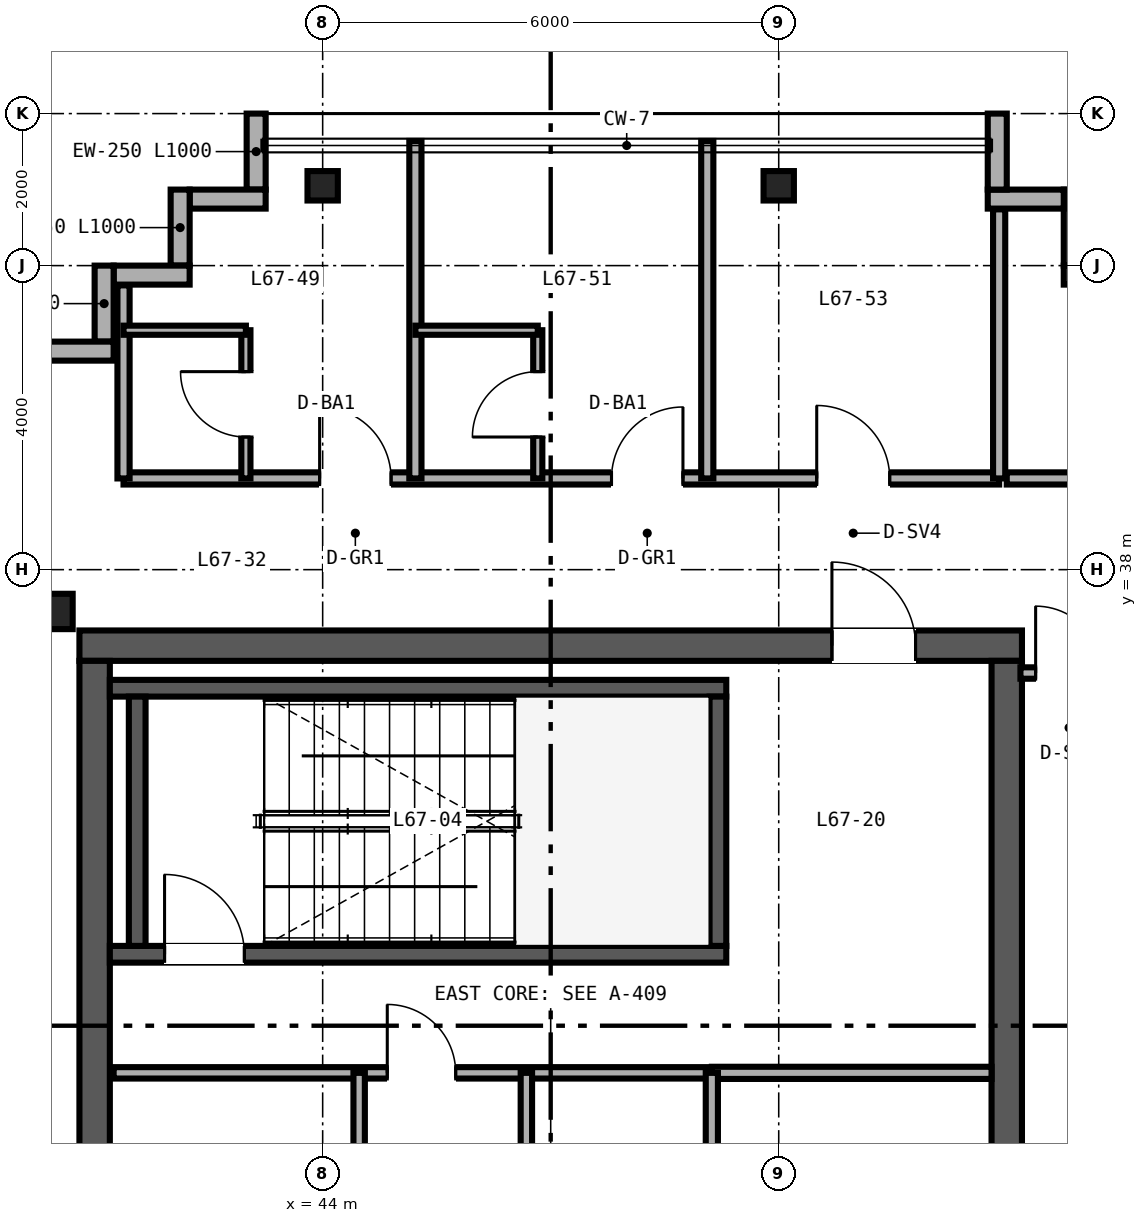
"""IFC4 building model, lengths in metres.
Left out: names, types, materials, properties, quantities, classifications, styles, units other than length and angle.
Written with IfcOpenShell. Run it as: python <this file> out.ifc"""

import sys

from ifc_helpers import new_model, si_unit, direction, frame, frame_2d, origin, origin_2d, place, context, subcontext, project, spatial, rectangle, i_section, extrude, source, transform, mapped, element, fill, save


model = new_model("IFC4")
c1 = context("Model", 3, precision=1e-05, world=origin(), true_north=direction((0.0, 1.0)))
c2 = subcontext(c1, "Body", "Model", "MODEL_VIEW")
j1 = project(units=[si_unit("LENGTHUNIT", "METRE"), si_unit("PLANEANGLEUNIT", "RADIAN")], contexts=[c1])
p1 = place(None, origin())
s1 = spatial("IfcSite", under=j1, at=p1, CompositionType="ELEMENT")
p2 = place(p1, origin())
s2 = spatial("IfcBuilding", under=s1, at=p2, CompositionType="ELEMENT")
p3 = place(p2, frame((0.0, 0.0, 265.2)))
s3 = spatial("IfcBuildingStorey", under=s2, at=p3, CompositionType="ELEMENT", Elevation=265.2)
p4 = place(p3, frame((40.8, 37.0, 0.0), z_axis=(0.0, 0.0, 1.0), x_axis=(1.0, 0.0, 0.0)))
e1 = element("IfcWall", 1, at=p4, inside=s3, PredefinedType="SHEAR", context=c2, shape_type="SweptSolid", body=[
    extrude(rectangle(XDim=12.4, YDim=0.4, at=frame_2d((6.2, 0.0))), origin(), (0.0, 0.0, 1.0), 3.38),
])
p5 = place(p4, frame((9.9, 0.0, 0.0)))
e2 = element("IfcOpeningElement", 2, at=p5, cuts=e1, PredefinedType="OPENING", context=c2, shape_type="SweptSolid", body=[
    extrude(rectangle(XDim=1.1, YDim=2.15, at=frame_2d((0.55, 1.075))), frame((0.0, 0.21, 0.0), z_axis=(0.0, -1.0, 0.0), x_axis=(1.0, 0.0, 0.0)), (0.0, 0.0, 1.0), 0.42),
])
for number, where, z_axis, x_axis in (
    (3, (41.0, 15.2, 0.0), (0.0, 0.0, 1.0), (0.0, 1.0, 0.0)),
    (4, (53.0, 15.2, 0.0), (0.0, 0.0, 1.0), (0.0, 1.0, 0.0)),
):
    element("IfcWall", number, at=place(p3, frame(where, z_axis=z_axis, x_axis=x_axis)), inside=s3, PredefinedType="SHEAR", context=c2, shape_type="SweptSolid", body=[
        extrude(rectangle(XDim=21.6, YDim=0.4, at=frame_2d((10.8, 0.0))), origin(), (0.0, 0.0, 1.0), 3.38),
    ])
p6 = place(p3, frame((41.2, 32.94, 0.0), z_axis=(0.0, 0.0, 1.0), x_axis=(1.0, 0.0, 0.0)))
e5 = element("IfcWall", 5, at=p6, inside=s3, PredefinedType="SHEAR", context=c2, shape_type="SweptSolid", body=[
    extrude(rectangle(XDim=8.11, YDim=0.22, at=frame_2d((4.055, 0.0))), origin(), (0.0, 0.0, 1.0), 3.4),
])
p7 = place(p6, frame((0.72, 0.0, 0.0)))
e6 = element("IfcOpeningElement", 6, at=p7, cuts=e5, PredefinedType="OPENING", context=c2, shape_type="SweptSolid", body=[
    extrude(rectangle(XDim=1.05, YDim=2.15, at=frame_2d((0.525, 1.075))), frame((0.0, 0.12, 0.0), z_axis=(0.0, -1.0, 0.0), x_axis=(1.0, 0.0, 0.0)), (0.0, 0.0, 1.0), 0.24),
])
p8 = place(p3, frame((41.2, 36.44, 0.0), z_axis=(0.0, 0.0, 1.0), x_axis=(1.0, 0.0, 0.0)))
e7 = element("IfcWall", 7, at=p8, inside=s3, PredefinedType="SHEAR", context=c2, shape_type="SweptSolid", body=[
    extrude(rectangle(XDim=8.11, YDim=0.22, at=frame_2d((4.055, 0.0))), origin(), (0.0, 0.0, 1.0), 3.4),
])
for number, where, z_axis, x_axis in (
    (8, (41.56, 33.05, 0.0), (0.0, 0.0, 1.0), (0.0, 1.0, 0.0)),
    (9, (49.2, 33.05, 0.0), (0.0, 0.0, 1.0), (0.0, 1.0, 0.0)),
):
    element("IfcWall", number, at=place(p3, frame(where, z_axis=z_axis, x_axis=x_axis)), inside=s3, PredefinedType="SHEAR", context=c2, shape_type="SweptSolid", body=[
        extrude(rectangle(XDim=3.28, YDim=0.22, at=frame_2d((1.64, 0.0))), origin(), (0.0, 0.0, 1.0), 3.4),
    ])
m1 = source(origin(), c2, "Body", "SweptSolid", [
    extrude(i_section(OverallWidth=0.422, OverallDepth=0.465, WebThickness=0.045, FlangeThickness=0.073, FilletRadius=0.025, at=origin_2d()), origin(), (0.0, 0.0, 1.0), 3.38),
])
p9 = place(p3, frame((40.5, 37.45, 0.0), z_axis=(0.0, 0.0, 1.0), x_axis=(1.0, 0.0, 0.0)))
e10 = element("IfcColumn", 10, at=p9, inside=s3, PredefinedType="COLUMN", context=c2, shape_type="MappedRepresentation", body=[
    mapped(m1, transform((0.0, 0.0, 0.0), scale=1.0)),
])
m2 = source(origin(), c2, "Body", "SweptSolid", [
    extrude(i_section(OverallWidth=0.399, OverallDepth=0.387, WebThickness=0.021, FlangeThickness=0.033, FilletRadius=0.025, at=origin_2d()), origin(), (0.0, 0.0, 1.0), 3.38),
])
for number, where, z_axis, x_axis in (
    (11, (44.0, 43.05, 0.0), (0.0, 0.0, 1.0), (1.0, 0.0, 0.0)),
    (12, (50.0, 43.05, 0.0), (0.0, 0.0, 1.0), (1.0, 0.0, 0.0)),
):
    element("IfcColumn", number, at=place(p3, frame(where, z_axis=z_axis, x_axis=x_axis)), inside=s3, PredefinedType="COLUMN", context=c2, shape_type="MappedRepresentation", body=[
        mapped(m2, transform((0.0, 0.0, 0.0), scale=1.0)),
    ])
for number, where, z_axis, x_axis in (
    (13, (54.75, 41.875, 0.0), (0.0, 0.0, 1.0), (-1.0, 0.0, 0.0)),
    (14, (53.875, 42.0, 0.0), (0.0, 0.0, 1.0), (0.0, 1.0, 0.0)),
    (15, (53.75, 42.875, 0.0), (0.0, 0.0, 1.0), (-1.0, 0.0, 0.0)),
    (16, (52.875, 43.0, 0.0), (0.0, 0.0, 1.0), (0.0, 1.0, 0.0)),
    (17, (43.125, 44.0, 0.0), (0.0, 0.0, 1.0), (0.0, -1.0, 0.0)),
    (18, (43.25, 42.875, 0.0), (0.0, 0.0, 1.0), (-1.0, 0.0, 0.0)),
    (19, (42.125, 43.0, 0.0), (0.0, 0.0, 1.0), (0.0, -1.0, 0.0)),
    (20, (42.25, 41.875, 0.0), (0.0, 0.0, 1.0), (-1.0, 0.0, 0.0)),
    (21, (41.125, 42.0, 0.0), (0.0, 0.0, 1.0), (0.0, -1.0, 0.0)),
):
    element("IfcWall", number, at=place(p3, frame(where, z_axis=z_axis, x_axis=x_axis)), inside=s3, PredefinedType="SOLIDWALL", context=c2, shape_type="SweptSolid", body=[
        extrude(rectangle(XDim=1.0, YDim=0.25, at=frame_2d((0.5, 0.0))), origin(), (0.0, 0.0, 1.0), 3.38),
    ])
p10 = place(p3, frame((41.25, 40.875, 0.0), z_axis=(0.0, 0.0, 1.0), x_axis=(-1.0, 0.0, 0.0)))
e22 = element("IfcWall", 22, at=p10, inside=s3, PredefinedType="SOLIDWALL", context=c2, shape_type="SweptSolid", body=[
    extrude(rectangle(XDim=1.25, YDim=0.25, at=frame_2d((0.625, 0.0))), origin(), (0.0, 0.0, 1.0), 3.38),
])
p11 = place(p3, frame((41.25, 31.38, 0.0), z_axis=(0.0, 0.0, 1.0), x_axis=(1.0, 0.0, 0.0)))
e23 = element("IfcWall", 23, at=p11, inside=s3, PredefinedType="PARTITIONING", context=c2, shape_type="SweptSolid", body=[
    extrude(rectangle(XDim=7.87, YDim=0.15, at=frame_2d((3.935, 0.0))), origin(), (0.0, 0.0, 1.0), 2.48),
])
p12 = place(p11, frame((3.6, 0.0, 0.0)))
e24 = element("IfcOpeningElement", 24, at=p12, cuts=e23, PredefinedType="OPENING", context=c2, shape_type="SweptSolid", body=[
    extrude(rectangle(XDim=0.9, YDim=2.15, at=frame_2d((0.45, 1.075))), frame((0.0, 0.085, 0.0), z_axis=(0.0, -1.0, 0.0), x_axis=(1.0, 0.0, 0.0)), (0.0, 0.0, 1.0), 0.17),
])
p13 = place(p3, frame((46.68, 15.25, 0.0), z_axis=(0.0, 0.0, 1.0), x_axis=(0.0, 1.0, 0.0)))
e25 = element("IfcWall", 25, at=p13, inside=s3, PredefinedType="PARTITIONING", context=c2, shape_type="SweptSolid", body=[
    extrude(rectangle(XDim=16.13, YDim=0.15, at=frame_2d((8.065, 0.0))), origin(), (0.0, 0.0, 1.0), 2.453),
])
p14 = place(p13, frame((3.2, 0.0, 0.0)))
e26 = element("IfcOpeningElement", 26, at=p14, cuts=e25, PredefinedType="OPENING", context=c2, shape_type="SweptSolid", body=[
    extrude(rectangle(XDim=0.88, YDim=2.15, at=frame_2d((0.44, 1.075))), frame((0.0, 0.085, 0.0), z_axis=(0.0, -1.0, 0.0), x_axis=(1.0, 0.0, 0.0)), (0.0, 0.0, 1.0), 0.17),
])
p15 = place(p13, frame((11.2, 0.0, 0.0)))
e27 = element("IfcOpeningElement", 27, at=p15, cuts=e25, PredefinedType="OPENING", context=c2, shape_type="SweptSolid", body=[
    extrude(rectangle(XDim=0.88, YDim=2.15, at=frame_2d((0.44, 1.075))), frame((0.0, 0.085, 0.0), z_axis=(0.0, -1.0, 0.0), x_axis=(1.0, 0.0, 0.0)), (0.0, 0.0, 1.0), 0.17),
])
p16 = place(p3, frame((49.12, 31.38, 0.0), z_axis=(0.0, 0.0, 1.0), x_axis=(1.0, 0.0, 0.0)))
e28 = element("IfcWall", 28, at=p16, inside=s3, PredefinedType="PARTITIONING", context=c2, shape_type="SweptSolid", body=[
    extrude(rectangle(XDim=3.68, YDim=0.16, at=frame_2d((1.84, 0.0))), origin(), (0.0, 0.0, 1.0), 2.48),
])
p17 = place(p3, frame((49.12, 15.25, 0.0), z_axis=(0.0, 0.0, 1.0), x_axis=(0.0, 1.0, 0.0)))
e29 = element("IfcWall", 29, at=p17, inside=s3, PredefinedType="PARTITIONING", context=c2, shape_type="SweptSolid", body=[
    extrude(rectangle(XDim=16.13, YDim=0.16, at=frame_2d((8.065, 0.0))), origin(), (0.0, 0.0, 1.0), 2.453),
])
p18 = place(p17, frame((2.2, 0.0, 0.0)))
e30 = element("IfcOpeningElement", 30, at=p18, cuts=e29, PredefinedType="OPENING", context=c2, shape_type="SweptSolid", body=[
    extrude(rectangle(XDim=0.9, YDim=2.15, at=frame_2d((0.45, 1.075))), frame((0.0, 0.09, 0.0), z_axis=(0.0, -1.0, 0.0), x_axis=(1.0, 0.0, 0.0)), (0.0, 0.0, 1.0), 0.18),
])
p19 = place(p17, frame((8.2, 0.0, 0.0)))
e31 = element("IfcOpeningElement", 31, at=p19, cuts=e29, PredefinedType="OPENING", context=c2, shape_type="SweptSolid", body=[
    extrude(rectangle(XDim=0.9, YDim=2.15, at=frame_2d((0.45, 1.075))), frame((0.0, 0.09, 0.0), z_axis=(0.0, -1.0, 0.0), x_axis=(1.0, 0.0, 0.0)), (0.0, 0.0, 1.0), 0.18),
])
p20 = place(p17, frame((13.5, 0.0, 0.0)))
e32 = element("IfcOpeningElement", 32, at=p20, cuts=e29, PredefinedType="OPENING", context=c2, shape_type="SweptSolid", body=[
    extrude(rectangle(XDim=0.9, YDim=2.15, at=frame_2d((0.45, 1.075))), frame((0.0, 0.09, 0.0), z_axis=(0.0, -1.0, 0.0), x_axis=(1.0, 0.0, 0.0)), (0.0, 0.0, 1.0), 0.18),
])
p21 = place(p3, frame((44.48, 15.25, 0.0), z_axis=(0.0, 0.0, 1.0), x_axis=(0.0, 1.0, 0.0)))
e33 = element("IfcWall", 33, at=p21, inside=s3, PredefinedType="PARTITIONING", context=c2, shape_type="SweptSolid", body=[
    extrude(rectangle(XDim=16.13, YDim=0.15, at=frame_2d((8.065, 0.0))), origin(), (0.0, 0.0, 1.0), 2.453),
])
p22 = place(p21, frame((2.2, 0.0, 0.0)))
e34 = element("IfcOpeningElement", 34, at=p22, cuts=e33, PredefinedType="OPENING", context=c2, shape_type="SweptSolid", body=[
    extrude(rectangle(XDim=0.9, YDim=2.15, at=frame_2d((0.45, 1.075))), frame((0.0, 0.085, 0.0), z_axis=(0.0, -1.0, 0.0), x_axis=(1.0, 0.0, 0.0)), (0.0, 0.0, 1.0), 0.17),
])
p23 = place(p21, frame((10.13, 0.0, 0.0)))
e35 = element("IfcOpeningElement", 35, at=p23, cuts=e33, PredefinedType="OPENING", context=c2, shape_type="SweptSolid", body=[
    extrude(rectangle(XDim=0.9, YDim=2.15, at=frame_2d((0.45, 1.075))), frame((0.0, 0.085, 0.0), z_axis=(0.0, -1.0, 0.0), x_axis=(1.0, 0.0, 0.0)), (0.0, 0.0, 1.0), 0.17),
])
p24 = place(p3, frame((41.38, 39.2, 0.0), z_axis=(0.0, 0.0, 1.0), x_axis=(1.0, 0.0, 0.0)))
e36 = element("IfcWall", 36, at=p24, inside=s3, PredefinedType="PARTITIONING", context=c2, shape_type="SweptSolid", body=[
    extrude(rectangle(XDim=11.52, YDim=0.16, at=frame_2d((5.76, 0.0))), origin(), (0.0, 0.0, 1.0), 3.38),
])
p25 = place(p24, frame((2.58, 0.0, 0.0)))
e37 = element("IfcOpeningElement", 37, at=p25, cuts=e36, PredefinedType="OPENING", context=c2, shape_type="SweptSolid", body=[
    extrude(rectangle(XDim=0.94, YDim=2.15, at=frame_2d((0.47, 1.075))), frame((0.0, 0.09, 0.0), z_axis=(0.0, -1.0, 0.0), x_axis=(1.0, 0.0, 0.0)), (0.0, 0.0, 1.0), 0.18),
])
p26 = place(p24, frame((6.42, 0.0, 0.0)))
e38 = element("IfcOpeningElement", 38, at=p26, cuts=e36, PredefinedType="OPENING", context=c2, shape_type="SweptSolid", body=[
    extrude(rectangle(XDim=0.94, YDim=2.15, at=frame_2d((0.47, 1.075))), frame((0.0, 0.09, 0.0), z_axis=(0.0, -1.0, 0.0), x_axis=(1.0, 0.0, 0.0)), (0.0, 0.0, 1.0), 0.18),
])
p27 = place(p24, frame((9.12, 0.0, 0.0)))
e39 = element("IfcOpeningElement", 39, at=p27, cuts=e36, PredefinedType="OPENING", context=c2, shape_type="SweptSolid", body=[
    extrude(rectangle(XDim=0.96, YDim=2.15, at=frame_2d((0.48, 1.075))), frame((0.0, 0.09, 0.0), z_axis=(0.0, -1.0, 0.0), x_axis=(1.0, 0.0, 0.0)), (0.0, 0.0, 1.0), 0.18),
])
p28 = place(p3, frame((41.38, 39.2, 0.0), z_axis=(0.0, 0.0, 1.0), x_axis=(0.0, 1.0, 0.0)))
e40 = element("IfcWall", 40, at=p28, inside=s3, PredefinedType="PARTITIONING", context=c2, shape_type="SweptSolid", body=[
    extrude(rectangle(XDim=2.54, YDim=0.16, at=frame_2d((1.27, 0.0))), origin(), (0.0, 0.0, 1.0), 3.38),
])
p29 = place(p3, frame((52.9, 39.2, 0.0), z_axis=(0.0, 0.0, 1.0), x_axis=(0.0, 1.0, 0.0)))
e41 = element("IfcWall", 41, at=p29, inside=s3, PredefinedType="PARTITIONING", context=c2, shape_type="SweptSolid", body=[
    extrude(rectangle(XDim=3.54, YDim=0.16, at=frame_2d((1.77, 0.0))), origin(), (0.0, 0.0, 1.0), 3.38),
])
p30 = place(p3, frame((45.22, 39.2, 0.0), z_axis=(0.0, 0.0, 1.0), x_axis=(0.0, 1.0, 0.0)))
e42 = element("IfcWall", 42, at=p30, inside=s3, PredefinedType="PARTITIONING", context=c2, shape_type="SweptSolid", body=[
    extrude(rectangle(XDim=4.44, YDim=0.16, at=frame_2d((2.22, 0.0))), origin(), (0.0, 0.0, 1.0), 2.687),
])
p31 = place(p3, frame((42.99, 39.2, 0.0), z_axis=(0.0, 0.0, 1.0), x_axis=(0.0, 1.0, 0.0)))
e43 = element("IfcWall", 43, at=p31, inside=s3, PredefinedType="PARTITIONING", context=c2, shape_type="SweptSolid", body=[
    extrude(rectangle(XDim=1.95, YDim=0.12, at=frame_2d((0.975, 0.0))), origin(), (0.0, 0.0, 1.0), 3.38),
])
p32 = place(p31, frame((0.545, 0.0, 0.0)))
e44 = element("IfcOpeningElement", 44, at=p32, cuts=e43, PredefinedType="OPENING", context=c2, shape_type="SweptSolid", body=[
    extrude(rectangle(XDim=0.86, YDim=2.1, at=frame_2d((0.43, 1.05))), frame((0.0, 0.07, 0.0), z_axis=(0.0, -1.0, 0.0), x_axis=(1.0, 0.0, 0.0)), (0.0, 0.0, 1.0), 0.14),
])
p33 = place(p3, frame((41.38, 41.15, 0.0), z_axis=(0.0, 0.0, 1.0), x_axis=(1.0, 0.0, 0.0)))
e45 = element("IfcWall", 45, at=p33, inside=s3, PredefinedType="PARTITIONING", context=c2, shape_type="SweptSolid", body=[
    extrude(rectangle(XDim=1.61, YDim=0.12, at=frame_2d((0.805, 0.0))), origin(), (0.0, 0.0, 1.0), 3.38),
])
p34 = place(p3, frame((49.06, 39.2, 0.0), z_axis=(0.0, 0.0, 1.0), x_axis=(0.0, 1.0, 0.0)))
e46 = element("IfcWall", 46, at=p34, inside=s3, PredefinedType="PARTITIONING", context=c2, shape_type="SweptSolid", body=[
    extrude(rectangle(XDim=4.44, YDim=0.16, at=frame_2d((2.22, 0.0))), origin(), (0.0, 0.0, 1.0), 2.687),
])
p35 = place(p3, frame((46.83, 39.2, 0.0), z_axis=(0.0, 0.0, 1.0), x_axis=(0.0, 1.0, 0.0)))
e47 = element("IfcWall", 47, at=p35, inside=s3, PredefinedType="PARTITIONING", context=c2, shape_type="SweptSolid", body=[
    extrude(rectangle(XDim=1.95, YDim=0.12, at=frame_2d((0.975, 0.0))), origin(), (0.0, 0.0, 1.0), 3.38),
])
p36 = place(p35, frame((0.545, 0.0, 0.0)))
e48 = element("IfcOpeningElement", 48, at=p36, cuts=e47, PredefinedType="OPENING", context=c2, shape_type="SweptSolid", body=[
    extrude(rectangle(XDim=0.86, YDim=2.1, at=frame_2d((0.43, 1.05))), frame((0.0, 0.07, 0.0), z_axis=(0.0, -1.0, 0.0), x_axis=(1.0, 0.0, 0.0)), (0.0, 0.0, 1.0), 0.14),
])
p37 = place(p3, frame((45.22, 41.15, 0.0), z_axis=(0.0, 0.0, 1.0), x_axis=(1.0, 0.0, 0.0)))
e49 = element("IfcWall", 49, at=p37, inside=s3, PredefinedType="PARTITIONING", context=c2, shape_type="SweptSolid", body=[
    extrude(rectangle(XDim=1.61, YDim=0.12, at=frame_2d((0.805, 0.0))), origin(), (0.0, 0.0, 1.0), 3.38),
])
p38 = place(p3, frame((53.18, 36.64, 0.0), z_axis=(0.0, 0.0, 1.0), x_axis=(1.0, 0.0, 0.0)))
e50 = element("IfcWall", 50, at=p38, inside=s3, PredefinedType="PARTITIONING", context=c2, shape_type="SweptSolid", body=[
    extrude(rectangle(XDim=2.66, YDim=0.15, at=frame_2d((1.33, 0.0))), origin(), (0.0, 0.0, 1.0), 2.763),
])
p39 = place(p38, frame((0.2, 0.0, 0.0)))
e51 = element("IfcOpeningElement", 51, at=p39, cuts=e50, PredefinedType="OPENING", context=c2, shape_type="SweptSolid", body=[
    extrude(rectangle(XDim=0.88, YDim=2.15, at=frame_2d((0.44, 1.075))), frame((0.0, 0.085, 0.0), z_axis=(0.0, -1.0, 0.0), x_axis=(1.0, 0.0, 0.0)), (0.0, 0.0, 1.0), 0.17),
])
p40 = place(p3, frame((53.0, 39.2, 0.0), z_axis=(0.0, 0.0, 1.0), x_axis=(1.0, 0.0, 0.0)))
e52 = element("IfcWall", 52, at=p40, inside=s3, PredefinedType="PARTITIONING", context=c2, shape_type="SweptSolid", body=[
    extrude(rectangle(XDim=2.65, YDim=0.16, at=frame_2d((1.325, 0.0))), origin(), (0.0, 0.0, 1.0), 3.38),
])
p41 = place(p40, frame((0.845, 0.0, 0.0)))
e53 = element("IfcOpeningElement", 53, at=p41, cuts=e52, PredefinedType="OPENING", context=c2, shape_type="SweptSolid", body=[
    extrude(rectangle(XDim=0.96, YDim=2.15, at=frame_2d((0.48, 1.075))), frame((0.0, 0.09, 0.0), z_axis=(0.0, -1.0, 0.0), x_axis=(1.0, 0.0, 0.0)), (0.0, 0.0, 1.0), 0.18),
])
m3 = source(origin(), c2, "Body", "SweptSolid", [
    extrude(rectangle(XDim=1.05, YDim=2.15, at=frame_2d((0.525, 1.075))), frame((0.0, 0.025, 0.0), z_axis=(0.0, -1.0, 0.0), x_axis=(1.0, 0.0, 0.0)), (0.0, 0.0, 1.0), 0.05),
])
p42 = place(p7, origin())
e54 = element("IfcDoor", 54, at=p42, inside=s3, OperationType="SINGLE_SWING_LEFT", PredefinedType="DOOR", context=c2, shape_type="MappedRepresentation", body=[
    mapped(m3, transform((0.0, 0.0, 0.0), scale=1.0)),
])
fill(e6, e54)
m4 = source(origin(), c2, "Body", "SweptSolid", [
    extrude(rectangle(XDim=0.9, YDim=2.15, at=frame_2d((0.45, 1.075))), frame((0.0, 0.025, 0.0), z_axis=(0.0, -1.0, 0.0), x_axis=(1.0, 0.0, 0.0)), (0.0, 0.0, 1.0), 0.05),
])
p43 = place(p12, origin())
e55 = element("IfcDoor", 55, at=p43, inside=s3, OperationType="SINGLE_SWING_LEFT", PredefinedType="DOOR", context=c2, shape_type="MappedRepresentation", body=[
    mapped(m4, transform((0.0, 0.0, 0.0), scale=1.0)),
])
fill(e24, e55)
m5 = source(origin(), c2, "Body", "SweptSolid", [
    extrude(rectangle(XDim=1.1, YDim=2.15, at=frame_2d((0.55, 1.075))), frame((0.0, 0.025, 0.0), z_axis=(0.0, -1.0, 0.0), x_axis=(1.0, 0.0, 0.0)), (0.0, 0.0, 1.0), 0.05),
])
p44 = place(p5, origin())
e56 = element("IfcDoor", 56, at=p44, inside=s3, OperationType="SINGLE_SWING_LEFT", PredefinedType="DOOR", context=c2, shape_type="MappedRepresentation", body=[
    mapped(m5, transform((0.0, 0.0, 0.0), scale=1.0)),
])
fill(e2, e56)
m6 = source(origin(), c2, "Body", "SweptSolid", [
    extrude(rectangle(XDim=0.86, YDim=2.1, at=frame_2d((0.43, 1.05))), frame((0.0, 0.025, 0.0), z_axis=(0.0, -1.0, 0.0), x_axis=(1.0, 0.0, 0.0)), (0.0, 0.0, 1.0), 0.05),
])
p45 = place(p32, origin())
e57 = element("IfcDoor", 57, at=p45, inside=s3, OperationType="SINGLE_SWING_RIGHT", PredefinedType="DOOR", context=c2, shape_type="MappedRepresentation", body=[
    mapped(m6, transform((0.0, 0.0, 0.0), scale=1.0)),
])
fill(e44, e57)
p46 = place(p36, origin())
e58 = element("IfcDoor", 58, at=p46, inside=s3, OperationType="SINGLE_SWING_LEFT", PredefinedType="DOOR", context=c2, shape_type="MappedRepresentation", body=[
    mapped(m6, transform((0.0, 0.0, 0.0), scale=1.0)),
])
fill(e48, e58)
m7 = source(origin(), c2, "Body", "SweptSolid", [
    extrude(rectangle(XDim=0.94, YDim=2.15, at=frame_2d((0.47, 1.075))), frame((0.0, 0.025, 0.0), z_axis=(0.0, -1.0, 0.0), x_axis=(1.0, 0.0, 0.0)), (0.0, 0.0, 1.0), 0.05),
])
p47 = place(p25, origin())
e59 = element("IfcDoor", 59, at=p47, inside=s3, OperationType="SINGLE_SWING_LEFT", PredefinedType="DOOR", context=c2, shape_type="MappedRepresentation", body=[
    mapped(m7, transform((0.0, 0.0, 0.0), scale=1.0)),
])
fill(e37, e59)
p48 = place(p26, origin())
e60 = element("IfcDoor", 60, at=p48, inside=s3, OperationType="SINGLE_SWING_RIGHT", PredefinedType="DOOR", context=c2, shape_type="MappedRepresentation", body=[
    mapped(m7, transform((0.0, 0.0, 0.0), scale=1.0)),
])
fill(e38, e60)
m8 = source(origin(), c2, "Body", "SweptSolid", [
    extrude(rectangle(XDim=0.96, YDim=2.15, at=frame_2d((0.48, 1.075))), frame((0.0, 0.025, 0.0), z_axis=(0.0, -1.0, 0.0), x_axis=(1.0, 0.0, 0.0)), (0.0, 0.0, 1.0), 0.05),
])
p49 = place(p27, origin())
e61 = element("IfcDoor", 61, at=p49, inside=s3, OperationType="SINGLE_SWING_LEFT", PredefinedType="DOOR", context=c2, shape_type="MappedRepresentation", body=[
    mapped(m8, transform((0.0, 0.0, 0.0), scale=1.0)),
])
fill(e39, e61)
m9 = source(origin(), c2, "Body", "SweptSolid", [
    extrude(rectangle(XDim=0.88, YDim=2.15, at=frame_2d((0.44, 1.075))), frame((0.0, 0.025, 0.0), z_axis=(0.0, -1.0, 0.0), x_axis=(1.0, 0.0, 0.0)), (0.0, 0.0, 1.0), 0.05),
])
p50 = place(p39, origin())
e62 = element("IfcDoor", 62, at=p50, inside=s3, OperationType="SINGLE_SWING_LEFT", PredefinedType="DOOR", context=c2, shape_type="MappedRepresentation", body=[
    mapped(m9, transform((0.0, 0.0, 0.0), scale=1.0)),
])
fill(e51, e62)
save(model, sys.argv[1])
